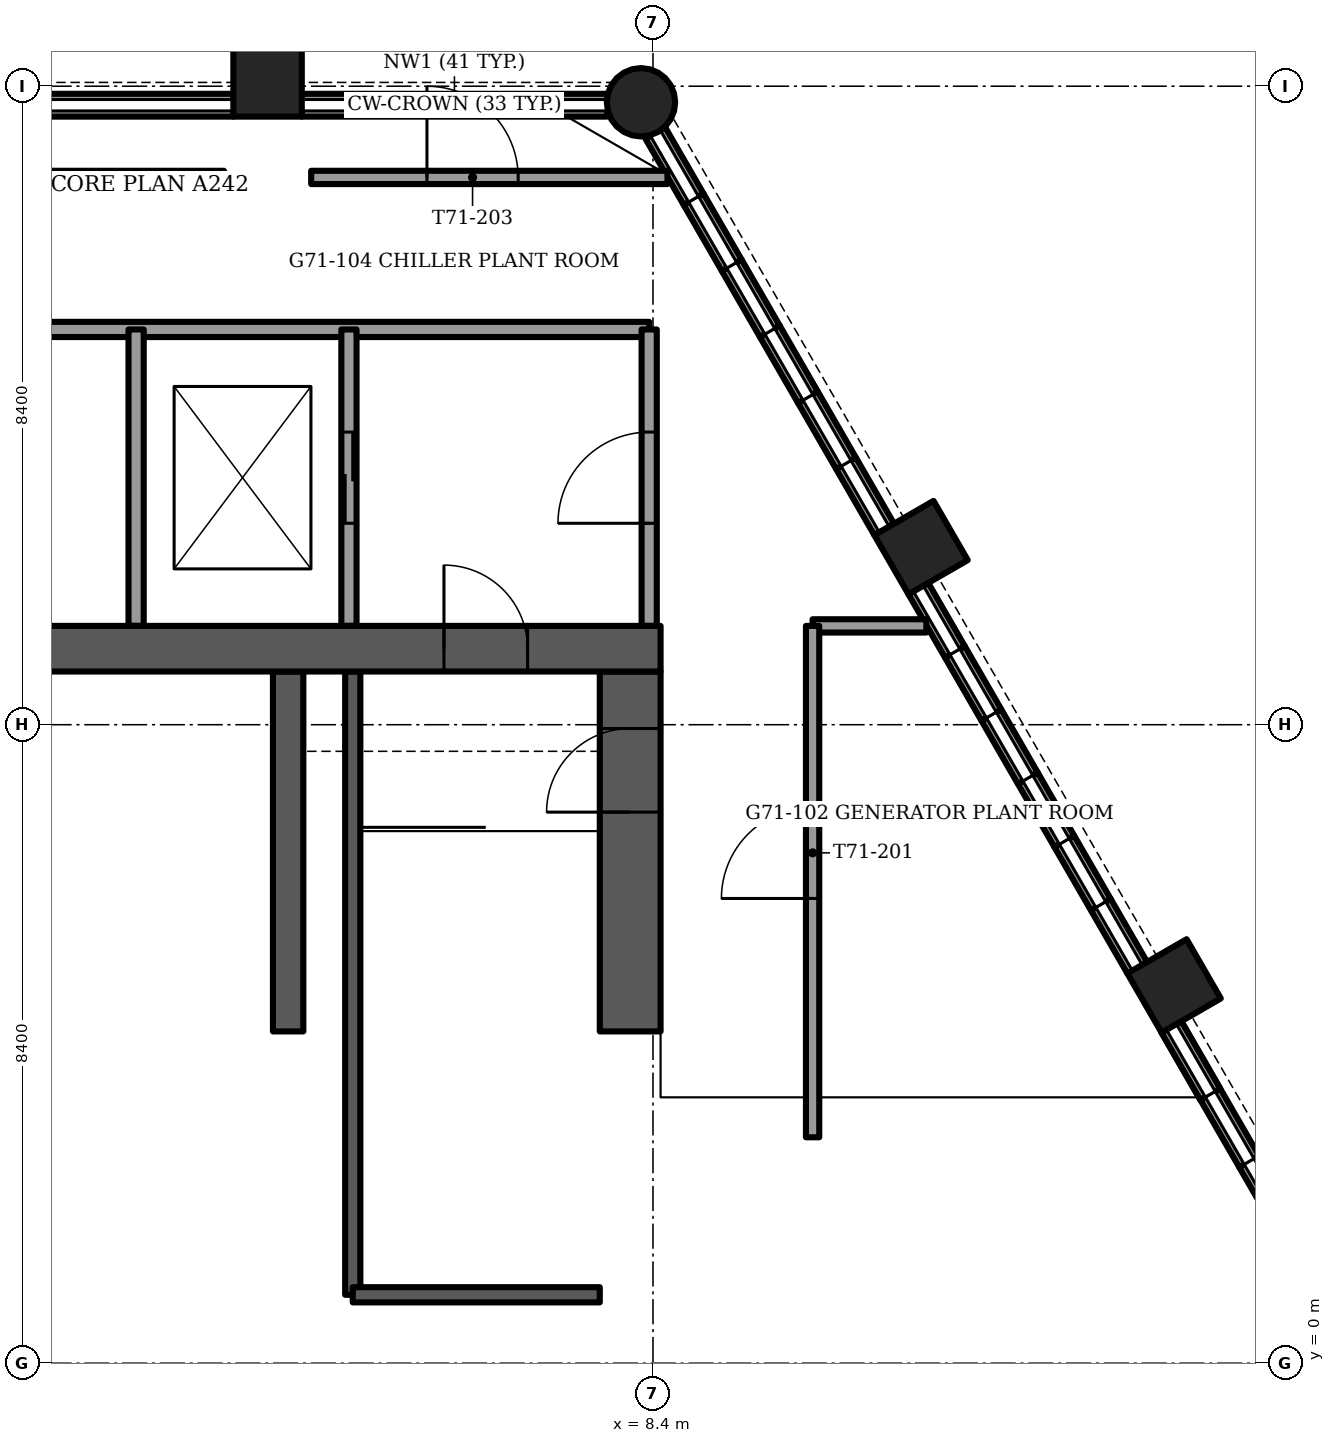
"""IFC4 building model, lengths in metres.
Left out: names, types, materials, properties, quantities, classifications, styles, units other than length and angle.
Written with IfcOpenShell. Run it as: python <this file> out.ifc"""

import sys

from ifc_helpers import new_model, si_unit, direction, frame, frame_2d, origin, origin_2d, place, context, subcontext, project, spatial, rectangle, circle, extrude, element, fill, save


model = new_model("IFC4")
c1 = context("Model", 3, precision=1e-05, world=origin(), true_north=direction((0.0, 1.0)))
c2 = subcontext(c1, "Body", "Model", "MODEL_VIEW")
j1 = project(units=[si_unit("LENGTHUNIT", "METRE"), si_unit("PLANEANGLEUNIT", "RADIAN")], contexts=[c1])
p1 = place(None, origin())
s1 = spatial("IfcSite", under=j1, at=p1, CompositionType="ELEMENT")
p2 = place(p1, origin())
s2 = spatial("IfcBuilding", under=s1, at=p2, CompositionType="ELEMENT")
p3 = place(p2, frame((0.0, 0.0, 288.5)))
s3 = spatial("IfcBuildingStorey", under=s2, at=p3, CompositionType="ELEMENT", Elevation=288.5)
p4 = place(p3, frame((-8.5, 9.4, -0.3), z_axis=(0.0, 0.0, 1.0), x_axis=(1.0, 0.0, 0.0)))
e1 = element("IfcWall", 1, at=p4, inside=s3, PredefinedType="SHEAR", context=c2, shape_type="SweptSolid", body=[
    extrude(rectangle(XDim=17.0, YDim=0.6, at=frame_2d((8.5, 0.0))), origin(), (0.0, 0.0, 1.0), 4.5),
])
p5 = place(p4, frame((1.75, 0.0, 0.0)))
e2 = element("IfcOpeningElement", 2, at=p5, cuts=e1, PredefinedType="OPENING", context=c2, shape_type="SweptSolid", body=[
    extrude(rectangle(XDim=1.1, YDim=2.1, at=frame_2d((0.55, 1.05))), frame((0.0, 0.3, 0.0), z_axis=(0.0, -1.0, 0.0), x_axis=(1.0, 0.0, 0.0)), (0.0, 0.0, 1.0), 0.6),
])
p6 = place(p4, frame((14.15, 0.0, 0.0)))
e3 = element("IfcOpeningElement", 3, at=p6, cuts=e1, PredefinedType="OPENING", context=c2, shape_type="SweptSolid", body=[
    extrude(rectangle(XDim=1.1, YDim=2.1, at=frame_2d((0.55, 1.05))), frame((0.0, 0.3, 0.0), z_axis=(0.0, -1.0, 0.0), x_axis=(1.0, 0.0, 0.0)), (0.0, 0.0, 1.0), 0.6),
])
p7 = place(p3, frame((8.1, 4.365, -0.3), z_axis=(0.0, 0.0, 1.0), x_axis=(0.0, 1.0, 0.0)))
e4 = element("IfcWall", 4, at=p7, inside=s3, PredefinedType="SHEAR", context=c2, shape_type="SweptSolid", body=[
    extrude(rectangle(XDim=4.735, YDim=0.8, at=frame_2d((2.368, 0.0))), origin(), (0.0, 0.0, 1.0), 4.5),
])
p8 = place(p7, frame((2.885, 0.0, 0.0)))
e5 = element("IfcOpeningElement", 5, at=p8, cuts=e4, PredefinedType="OPENING", context=c2, shape_type="SweptSolid", body=[
    extrude(rectangle(XDim=1.1, YDim=2.1, at=frame_2d((0.55, 1.05))), frame((0.0, 0.4, 0.0), z_axis=(0.0, -1.0, 0.0), x_axis=(1.0, 0.0, 0.0)), (0.0, 0.0, 1.0), 0.8),
])
p9 = place(p3, frame((3.6, 4.365, -0.3), z_axis=(0.0, 0.0, 1.0), x_axis=(0.0, 1.0, 0.0)))
e6 = element("IfcWall", 6, at=p9, inside=s3, PredefinedType="SHEAR", context=c2, shape_type="SweptSolid", body=[
    extrude(rectangle(XDim=4.735, YDim=0.4, at=frame_2d((2.368, 0.0))), origin(), (0.0, 0.0, 1.0), 4.5),
])
p10 = place(p3, frame((8.242, 16.589, -1.2), z_axis=(0.0, 0.0, 1.0), x_axis=(1.0, 0.0, 0.0)))
e7 = element("IfcColumn", 7, at=p10, inside=s3, PredefinedType="COLUMN", context=c2, shape_type="SweptSolid", body=[
    extrude(circle(Radius=0.45, at=origin_2d()), origin(), (0.0, 0.0, 1.0), 4.5),
])
for number, where, z_axis, x_axis in (
    (8, (3.329, 16.85, -1.2), (0.0, 0.0, 1.0), (1.0, 0.0, 0.0)),
    (9, (15.256, 4.963, -1.2), (0.0, 0.0, 1.0), (0.5, -0.866, 0.0)),
    (10, (11.926, 10.73, -1.2), (0.0, 0.0, 1.0), (0.5, -0.866, 0.0)),
):
    element("IfcColumn", number, at=place(p3, frame(where, z_axis=z_axis, x_axis=x_axis)), inside=s3, PredefinedType="COLUMN", context=c2, shape_type="SweptSolid", body=[
        extrude(rectangle(XDim=0.9, YDim=0.9, at=origin_2d()), origin(), (0.0, 0.0, 1.0), 4.5),
    ])
p11 = place(p3, frame((7.796, 16.55, 0.0), z_axis=(0.0, 0.0, 1.0), x_axis=(-1.0, 0.0, 0.0)))
e11 = element("IfcWall", 11, at=p11, inside=s3, PredefinedType="SOLIDWALL", context=c2, shape_type="SweptSolid", body=[
    extrude(rectangle(XDim=4.017, YDim=0.3, at=frame_2d((2.008, 0.0))), origin(), (0.0, 0.0, 1.0), 1.0),
])
p12 = place(p3, frame((2.879, 16.55, 0.0), z_axis=(0.0, 0.0, 1.0), x_axis=(-1.0, 0.0, 0.0)))
e12 = element("IfcWall", 12, at=p12, inside=s3, PredefinedType="SOLIDWALL", context=c2, shape_type="SweptSolid", body=[
    extrude(rectangle(XDim=5.759, YDim=0.3, at=frame_2d((2.879, 0.0))), origin(), (0.0, 0.0, 1.0), 1.0),
])
for number, where, z_axis, x_axis in (
    (13, (16.753, 1.77, 0.0), (0.0, 0.0, 1.0), (-0.5, 0.866, 0.0)),
    (14, (16.242, 2.654, 0.0), (0.0, 0.0, 1.0), (-0.5, 0.866, 0.0)),
    (15, (15.732, 3.539, 0.0), (0.0, 0.0, 1.0), (-0.5, 0.866, 0.0)),
):
    element("IfcWall", number, at=place(p3, frame(where, z_axis=z_axis, x_axis=x_axis)), inside=s3, PredefinedType="SOLIDWALL", context=c2, shape_type="SweptSolid", body=[
        extrude(rectangle(XDim=1.021, YDim=0.3, at=frame_2d((0.511, 0.0))), origin(), (0.0, 0.0, 1.0), 1.0),
    ])
p13 = place(p3, frame((15.732, 3.539, 3.3), z_axis=(0.0, 0.0, 1.0), x_axis=(-0.500046605208, 0.865998494583, 0.0)))
e16 = element("IfcWall", 16, at=p13, inside=s3, PredefinedType="SOLIDWALL", context=c2, shape_type="SweptSolid", body=[
    extrude(rectangle(XDim=1.021, YDim=0.3, at=frame_2d((0.511, 0.0))), origin(), (0.0, 0.0, 1.0), 0.839),
])
p14 = place(p3, frame((14.771, 5.203, 0.0), z_axis=(0.0, 0.0, 1.0), x_axis=(-0.500133489192, 0.865948320045, 0.0)))
e17 = element("IfcWall", 17, at=p14, inside=s3, PredefinedType="SOLIDWALL", context=c2, shape_type="SweptSolid", body=[
    extrude(rectangle(XDim=0.96, YDim=0.3, at=frame_2d((0.48, 0.0))), origin(), (0.0, 0.0, 1.0), 1.0),
])
p15 = place(p3, frame((14.291, 6.034, 0.0), z_axis=(0.0, 0.0, 1.0), x_axis=(-0.500023335103, 0.866011930837, 0.0)))
e18 = element("IfcWall", 18, at=p15, inside=s3, PredefinedType="SOLIDWALL", context=c2, shape_type="SweptSolid", body=[
    extrude(rectangle(XDim=0.96, YDim=0.3, at=frame_2d((0.48, 0.0))), origin(), (0.0, 0.0, 1.0), 1.0),
])
p16 = place(p3, frame((13.811, 6.865, 0.0), z_axis=(0.0, 0.0, 1.0), x_axis=(-0.499832553123, 0.866122057702, 0.0)))
e19 = element("IfcWall", 19, at=p16, inside=s3, PredefinedType="SOLIDWALL", context=c2, shape_type="SweptSolid", body=[
    extrude(rectangle(XDim=0.96, YDim=0.3, at=frame_2d((0.48, 0.0))), origin(), (0.0, 0.0, 1.0), 1.0),
])
p17 = place(p3, frame((13.331, 7.697, 0.0), z_axis=(0.0, 0.0, 1.0), x_axis=(-0.500023335103, 0.866011930837, 0.0)))
e20 = element("IfcWall", 20, at=p17, inside=s3, PredefinedType="SOLIDWALL", context=c2, shape_type="SweptSolid", body=[
    extrude(rectangle(XDim=0.96, YDim=0.3, at=frame_2d((0.48, 0.0))), origin(), (0.0, 0.0, 1.0), 1.0),
])
for number, where, z_axis, x_axis in (
    (21, (12.851, 8.528, 0.0), (0.0, 0.0, 1.0), (-0.5, 0.866, 0.0)),
    (22, (12.371, 9.359, 0.0), (0.0, 0.0, 1.0), (-0.5, 0.866, 0.0)),
):
    element("IfcWall", number, at=place(p3, frame(where, z_axis=z_axis, x_axis=x_axis)), inside=s3, PredefinedType="SOLIDWALL", context=c2, shape_type="SweptSolid", body=[
        extrude(rectangle(XDim=0.96, YDim=0.3, at=frame_2d((0.48, 0.0))), origin(), (0.0, 0.0, 1.0), 1.0),
    ])
for number, where, z_axis, x_axis in (
    (23, (11.441, 10.97, 0.0), (0.0, 0.0, 1.0), (-0.5, 0.866, 0.0)),
    (24, (10.94, 11.839, 0.0), (0.0, 0.0, 1.0), (-0.5, 0.866, 0.0)),
    (25, (10.438, 12.707, 0.0), (0.0, 0.0, 1.0), (-0.5, 0.866, 0.0)),
):
    element("IfcWall", number, at=place(p3, frame(where, z_axis=z_axis, x_axis=x_axis)), inside=s3, PredefinedType="SOLIDWALL", context=c2, shape_type="SweptSolid", body=[
        extrude(rectangle(XDim=1.003, YDim=0.3, at=frame_2d((0.501, 0.0))), origin(), (0.0, 0.0, 1.0), 1.0),
    ])
p18 = place(p3, frame((9.937, 13.576, 0.0), z_axis=(0.0, 0.0, 1.0), x_axis=(-0.499961250474, 0.866047774678, 0.0)))
e26 = element("IfcWall", 26, at=p18, inside=s3, PredefinedType="SOLIDWALL", context=c2, shape_type="SweptSolid", body=[
    extrude(rectangle(XDim=1.003, YDim=0.3, at=frame_2d((0.501, 0.0))), origin(), (0.0, 0.0, 1.0), 1.0),
])
p19 = place(p3, frame((9.435, 14.445, 0.0), z_axis=(0.0, 0.0, 1.0), x_axis=(-0.500038395149, 0.8660032352, 0.0)))
e27 = element("IfcWall", 27, at=p19, inside=s3, PredefinedType="SOLIDWALL", context=c2, shape_type="SweptSolid", body=[
    extrude(rectangle(XDim=1.003, YDim=0.3, at=frame_2d((0.502, 0.0))), origin(), (0.0, 0.0, 1.0), 1.0),
])
p20 = place(p3, frame((8.934, 15.314, 0.0), z_axis=(0.0, 0.0, 1.0), x_axis=(-0.500143783026, 0.865942374699, 0.0)))
e28 = element("IfcWall", 28, at=p20, inside=s3, PredefinedType="SOLIDWALL", context=c2, shape_type="SweptSolid", body=[
    extrude(rectangle(XDim=1.003, YDim=0.3, at=frame_2d((0.501, 0.0))), origin(), (0.0, 0.0, 1.0), 1.0),
])
p21 = place(p3, frame((10.5, 9.7, 0.0), z_axis=(0.0, 0.0, 1.0), x_axis=(1.0, 0.0, 0.0)))
e29 = element("IfcWall", 29, at=p21, inside=s3, PredefinedType="PARTITIONING", context=c2, shape_type="SweptSolid", body=[
    extrude(rectangle(XDim=1.496, YDim=0.175, at=frame_2d((0.748, 0.0))), origin(), (0.0, 0.0, 1.0), 4.2),
])
p22 = place(p3, frame((-2.756, 15.6, 0.0), z_axis=(0.0, 0.0, 1.0), x_axis=(1.0, 0.0, 0.0)))
e30 = element("IfcWall", 30, at=p22, inside=s3, PredefinedType="PARTITIONING", context=c2, shape_type="SweptSolid", body=[
    extrude(rectangle(XDim=5.512, YDim=0.175, at=frame_2d((2.756, 0.0))), origin(), (0.0, 0.0, 1.0), 4.2),
])
p23 = place(p3, frame((3.903, 15.6, 0.0), z_axis=(0.0, 0.0, 1.0), x_axis=(1.0, 0.0, 0.0)))
e31 = element("IfcWall", 31, at=p23, inside=s3, PredefinedType="PARTITIONING", context=c2, shape_type="SweptSolid", body=[
    extrude(rectangle(XDim=4.687, YDim=0.175, at=frame_2d((2.344, 0.0))), origin(), (0.0, 0.0, 1.0), 4.2),
])
p24 = place(p23, frame((1.523, 0.0, 0.0)))
e32 = element("IfcOpeningElement", 32, at=p24, cuts=e31, PredefinedType="OPENING", context=c2, shape_type="SweptSolid", body=[
    extrude(rectangle(XDim=1.2, YDim=2.1, at=frame_2d((0.6, 1.05))), frame((0.0, 0.087, 0.0), z_axis=(0.0, -1.0, 0.0), x_axis=(1.0, 0.0, 0.0)), (0.0, 0.0, 1.0), 0.175),
])
p25 = place(p3, frame((10.5, 2.972, 0.0), z_axis=(0.0, 0.0, 1.0), x_axis=(0.0, 1.0, 0.0)))
e33 = element("IfcWall", 33, at=p25, inside=s3, PredefinedType="PARTITIONING", context=c2, shape_type="SweptSolid", body=[
    extrude(rectangle(XDim=6.728, YDim=0.175, at=frame_2d((3.364, 0.0))), origin(), (0.0, 0.0, 1.0), 4.155),
])
p26 = place(p25, frame((3.142, 0.0, 0.0)))
e34 = element("IfcOpeningElement", 34, at=p26, cuts=e33, PredefinedType="OPENING", context=c2, shape_type="SweptSolid", body=[
    extrude(rectangle(XDim=1.2, YDim=2.1, at=frame_2d((0.6, 1.05))), frame((0.0, 0.087, 0.0), z_axis=(0.0, -1.0, 0.0), x_axis=(1.0, 0.0, 0.0)), (0.0, 0.0, 1.0), 0.175),
])
p27 = place(p3, frame((4.45, 0.9, -0.3), z_axis=(0.0, 0.0, 1.0), x_axis=(0.0, 1.0, 0.0)))
e35 = element("IfcWall", 35, at=p27, inside=s3, PredefinedType="SOLIDWALL", context=c2, shape_type="SweptSolid", body=[
    extrude(rectangle(XDim=8.2, YDim=0.2, at=frame_2d((4.1, 0.0))), origin(), (0.0, 0.0, 1.0), 4.5),
])
p28 = place(p3, frame((4.45, 0.9, -0.3), z_axis=(0.0, 0.0, 1.0), x_axis=(1.0, 0.0, 0.0)))
e36 = element("IfcWall", 36, at=p28, inside=s3, PredefinedType="SOLIDWALL", context=c2, shape_type="SweptSolid", body=[
    extrude(rectangle(XDim=3.25, YDim=0.2, at=frame_2d((1.625, 0.0))), origin(), (0.0, 0.0, 1.0), 4.5),
])
p29 = place(p3, frame((-8.35, 13.6, 0.0), z_axis=(0.0, 0.0, 1.0), x_axis=(1.0, 0.0, 0.0)))
e37 = element("IfcWall", 37, at=p29, inside=s3, PredefinedType="PARTITIONING", context=c2, shape_type="SweptSolid", body=[
    extrude(rectangle(XDim=16.7, YDim=0.2, at=frame_2d((8.35, 0.0))), origin(), (0.0, 0.0, 1.0), 4.2),
])
p30 = place(p3, frame((8.35, 9.7, 0.0), z_axis=(0.0, 0.0, 1.0), x_axis=(0.0, 1.0, 0.0)))
e38 = element("IfcWall", 38, at=p30, inside=s3, PredefinedType="PARTITIONING", context=c2, shape_type="SweptSolid", body=[
    extrude(rectangle(XDim=3.9, YDim=0.2, at=frame_2d((1.95, 0.0))), origin(), (0.0, 0.0, 1.0), 4.2),
])
p31 = place(p30, frame((1.35, 0.0, 0.0)))
e39 = element("IfcOpeningElement", 39, at=p31, cuts=e38, PredefinedType="OPENING", context=c2, shape_type="SweptSolid", body=[
    extrude(rectangle(XDim=1.2, YDim=2.1, at=frame_2d((0.6, 1.05))), frame((0.0, 0.1, 0.0), z_axis=(0.0, -1.0, 0.0), x_axis=(1.0, 0.0, 0.0)), (0.0, 0.0, 1.0), 0.2),
])
p32 = place(p3, frame((4.4, 9.7, 0.0), z_axis=(0.0, 0.0, 1.0), x_axis=(0.0, 1.0, 0.0)))
e40 = element("IfcWall", 40, at=p32, inside=s3, PredefinedType="PARTITIONING", context=c2, shape_type="SweptSolid", body=[
    extrude(rectangle(XDim=3.9, YDim=0.2, at=frame_2d((1.95, 0.0))), origin(), (0.0, 0.0, 1.0), 4.2),
])
p33 = place(p32, frame((1.35, 0.0, 0.0)))
e41 = element("IfcOpeningElement", 41, at=p33, cuts=e40, PredefinedType="OPENING", context=c2, shape_type="SweptSolid", body=[
    extrude(rectangle(XDim=1.2, YDim=2.1, at=frame_2d((0.6, 1.05))), frame((0.0, 0.1, 0.0), z_axis=(0.0, -1.0, 0.0), x_axis=(1.0, 0.0, 0.0)), (0.0, 0.0, 1.0), 0.2),
])
p34 = place(p3, frame((1.6, 9.7, 0.0), z_axis=(0.0, 0.0, 1.0), x_axis=(0.0, 1.0, 0.0)))
e42 = element("IfcWall", 42, at=p34, inside=s3, PredefinedType="PARTITIONING", context=c2, shape_type="SweptSolid", body=[
    extrude(rectangle(XDim=3.9, YDim=0.2, at=frame_2d((1.95, 0.0))), origin(), (0.0, 0.0, 1.0), 4.2),
])
p35 = place(p26, origin())
e43 = element("IfcDoor", 43, at=p35, inside=s3, OperationType="SINGLE_SWING_LEFT", PredefinedType="DOOR", context=c2, shape_type="SweptSolid", body=[
    extrude(rectangle(XDim=1.2, YDim=2.1, at=frame_2d((0.6, 1.05))), frame((0.0, 0.025, 0.0), z_axis=(0.0, -1.0, 0.0), x_axis=(1.0, 0.0, 0.0)), (0.0, 0.0, 1.0), 0.05),
])
fill(e34, e43)
p36 = place(p24, origin())
e44 = element("IfcDoor", 44, at=p36, inside=s3, OperationType="SINGLE_SWING_LEFT", PredefinedType="DOOR", context=c2, shape_type="SweptSolid", body=[
    extrude(rectangle(XDim=1.2, YDim=2.1, at=frame_2d((0.6, 1.05))), frame((0.0, 0.025, 0.0), z_axis=(0.0, -1.0, 0.0), x_axis=(1.0, 0.0, 0.0)), (0.0, 0.0, 1.0), 0.05),
])
fill(e32, e44)
p37 = place(p6, origin())
e45 = element("IfcDoor", 45, at=p37, inside=s3, OperationType="SINGLE_SWING_RIGHT", PredefinedType="DOOR", context=c2, shape_type="SweptSolid", body=[
    extrude(rectangle(XDim=1.1, YDim=2.1, at=frame_2d((0.55, 1.05))), frame((0.0, 0.025, 0.0), z_axis=(0.0, -1.0, 0.0), x_axis=(1.0, 0.0, 0.0)), (0.0, 0.0, 1.0), 0.05),
])
fill(e3, e45)
p38 = place(p8, origin())
e46 = element("IfcDoor", 46, at=p38, inside=s3, OperationType="SINGLE_SWING_LEFT", PredefinedType="DOOR", context=c2, shape_type="SweptSolid", body=[
    extrude(rectangle(XDim=1.1, YDim=2.1, at=frame_2d((0.55, 1.05))), frame((0.0, 0.025, 0.0), z_axis=(0.0, -1.0, 0.0), x_axis=(1.0, 0.0, 0.0)), (0.0, 0.0, 1.0), 0.05),
])
fill(e5, e46)
p39 = place(p33, origin())
e47 = element("IfcDoor", 47, at=p39, inside=s3, OperationType="SLIDING_TO_LEFT", PredefinedType="DOOR", context=c2, shape_type="SweptSolid", body=[
    extrude(rectangle(XDim=1.2, YDim=2.1, at=frame_2d((0.6, 1.05))), frame((0.0, 0.025, 0.0), z_axis=(0.0, -1.0, 0.0), x_axis=(1.0, 0.0, 0.0)), (0.0, 0.0, 1.0), 0.05),
])
fill(e41, e47)
p40 = place(p31, origin())
e48 = element("IfcDoor", 48, at=p40, inside=s3, OperationType="SINGLE_SWING_LEFT", PredefinedType="DOOR", context=c2, shape_type="SweptSolid", body=[
    extrude(rectangle(XDim=1.2, YDim=2.1, at=frame_2d((0.6, 1.05))), frame((0.0, 0.025, 0.0), z_axis=(0.0, -1.0, 0.0), x_axis=(1.0, 0.0, 0.0)), (0.0, 0.0, 1.0), 0.05),
])
fill(e39, e48)
save(model, sys.argv[1])
